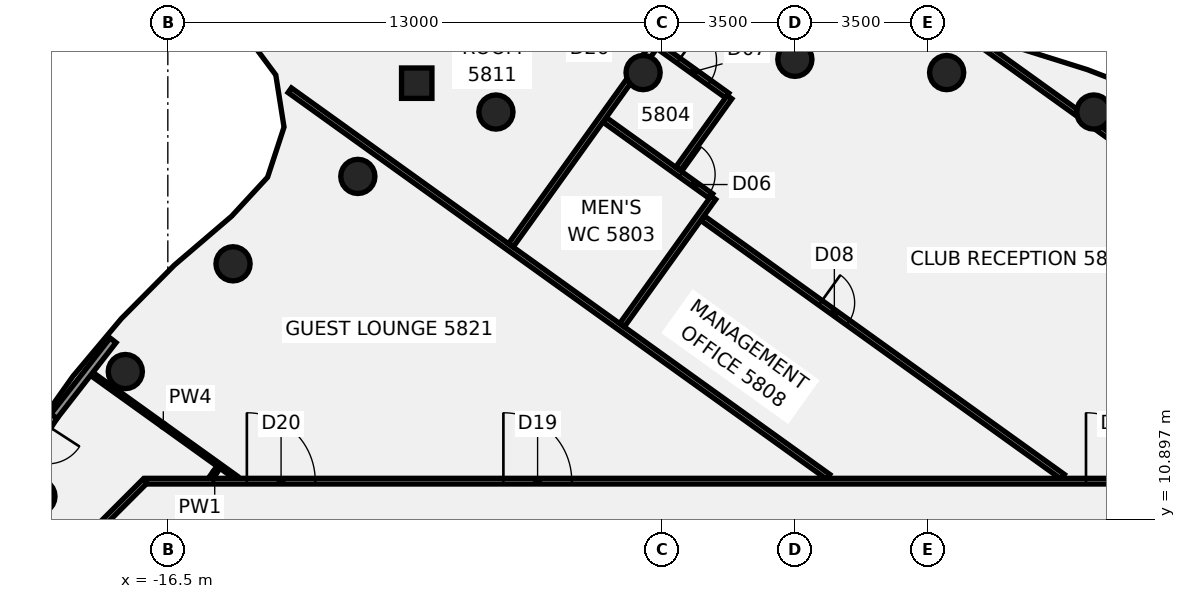
"""IFC4 building model, lengths in metres.
Left out: names, types, materials, properties, quantities, classifications, styles, units other than length and angle.
Written with IfcOpenShell. Run it as: python <this file> out.ifc"""

import sys

from ifc_helpers import new_model, si_unit, direction, frame, frame_2d, origin, origin_2d, place, context, subcontext, project, spatial, rectangle, circle, extrude, element, fill, save


model = new_model("IFC4")
c1 = context("Model", 3, precision=1e-05, world=origin(), true_north=direction((0.0, 1.0)))
c2 = subcontext(c1, "Body", "Model", "MODEL_VIEW")
j1 = project(units=[si_unit("LENGTHUNIT", "METRE"), si_unit("PLANEANGLEUNIT", "RADIAN")], contexts=[c1])
p1 = place(None, origin())
s1 = spatial("IfcSite", under=j1, at=p1, CompositionType="ELEMENT")
p2 = place(p1, origin())
s2 = spatial("IfcBuilding", under=s1, at=p2, CompositionType="ELEMENT")
p3 = place(p2, frame((0.0, 0.0, 230.7)))
s3 = spatial("IfcBuildingStorey", under=s2, at=p3, CompositionType="ELEMENT", Elevation=230.7)
for number, where, z_axis, x_axis in (
    (1, (7.866, 21.613, -0.14), (0.0, 0.0, 1.0), (1.0, 0.0, 0.0)),
    (2, (3.994, 22.651, -0.14), (0.0, 0.0, 1.0), (1.0, 0.0, 0.0)),
    (3, (0.0, 23.0, -0.14), (0.0, 0.0, 1.0), (1.0, 0.0, 0.0)),
    (4, (-3.994, 22.651, -0.14), (0.0, 0.0, 1.0), (1.0, 0.0, 0.0)),
    (5, (-7.866, 21.613, -0.14), (0.0, 0.0, 1.0), (1.0, 0.0, 0.0)),
    (6, (-11.5, 19.919, -0.14), (0.0, 0.0, 1.0), (1.0, 0.0, 0.0)),
    (7, (-14.784, 17.619, -0.14), (0.0, 0.0, 1.0), (1.0, 0.0, 0.0)),
    (8, (-17.619, 14.784, -0.14), (0.0, 0.0, 1.0), (1.0, 0.0, 0.0)),
    (9, (-19.919, 11.5, -0.14), (0.0, 0.0, 1.0), (1.0, 0.0, 0.0)),
):
    element("IfcColumn", number, at=place(p3, frame(where, z_axis=z_axis, x_axis=x_axis)), inside=s3, PredefinedType="COLUMN", context=c2, shape_type="SweptSolid", body=[
        extrude(circle(Radius=0.45, at=origin_2d()), origin(), (0.0, 0.0, 1.0), 3.6),
    ])
p4 = place(p3, frame((-9.95, 22.372, -0.139), z_axis=(-0.001423368327, -0.050360127001, 0.998730109505), x_axis=(0.583112220607, 0.811318568175, 0.041741096219)))
e10 = element("IfcColumn", 10, at=p4, inside=s3, PredefinedType="COLUMN", context=c2, shape_type="SweptSolid", body=[
    extrude(rectangle(XDim=0.8, YDim=0.8, at=origin_2d()), origin(), (0.0, 0.0, 1.0), 3.602),
])
p5 = place(p3, frame((-18.533, 14.744, 0.0), z_axis=(0.0, 0.0, 1.0), x_axis=(0.812404895157, -0.583093720019, 0.0)))
e11 = element("IfcWall", 11, at=p5, inside=s3, PredefinedType="PARTITIONING", context=c2, shape_type="SweptSolid", body=[
    extrude(rectangle(XDim=4.713, YDim=0.1, at=frame_2d((2.357, 0.0))), origin(), (0.0, 0.0, 1.0), 2.864),
])
p6 = place(p3, frame((-13.291, 22.185, 0.0), z_axis=(0.0, 0.0, 1.0), x_axis=(0.812381382917, -0.583126477439, 0.0)))
e12 = element("IfcWall", 12, at=p6, inside=s3, PredefinedType="PARTITIONING", context=c2, shape_type="SweptSolid", body=[
    extrude(rectangle(XDim=17.438, YDim=0.15, at=frame_2d((8.719, 0.0))), origin(), (0.0, 0.0, 1.0), 2.864),
])
p7 = place(p3, frame((-5.005, 21.407, 0.0), z_axis=(0.0, 0.0, 1.0), x_axis=(0.812433901196, -0.583053304757, 0.0)))
e13 = element("IfcWall", 13, at=p7, inside=s3, PredefinedType="PARTITIONING", context=c2, shape_type="SweptSolid", body=[
    extrude(rectangle(XDim=3.445, YDim=0.15, at=frame_2d((1.723, 0.0))), origin(), (0.0, 0.0, 1.0), 2.864),
])
p8 = place(p7, frame((2.47, 0.0, 0.0)))
e14 = element("IfcOpeningElement", 14, at=p8, cuts=e13, PredefinedType="OPENING", context=c2, shape_type="SweptSolid", body=[
    extrude(rectangle(XDim=0.9, YDim=2.1, at=frame_2d((0.45, 1.05))), frame((0.0, 0.085, 0.0), z_axis=(0.0, -1.0, 0.0), x_axis=(1.0, 0.0, 0.0)), (0.0, 0.0, 1.0), 0.17),
])
p9 = place(p3, frame((-3.589, 23.345, 0.0), z_axis=(0.0, 0.0, 1.0), x_axis=(0.812463673424, -0.583011817518, 0.0)))
e15 = element("IfcWall", 15, at=p9, inside=s3, PredefinedType="PARTITIONING", context=c2, shape_type="SweptSolid", body=[
    extrude(rectangle(XDim=2.225, YDim=0.15, at=frame_2d((1.112, 0.0))), origin(), (0.0, 0.0, 1.0), 2.864),
])
p10 = place(p9, frame((0.65, 0.0, 0.0)))
e16 = element("IfcOpeningElement", 16, at=p10, cuts=e15, PredefinedType="OPENING", context=c2, shape_type="SweptSolid", body=[
    extrude(rectangle(XDim=1.0, YDim=2.1, at=frame_2d((0.5, 1.05))), frame((0.0, 0.085, 0.0), z_axis=(0.0, -1.0, 0.0), x_axis=(1.0, 0.0, 0.0)), (0.0, 0.0, 1.0), 0.17),
])
p11 = place(p3, frame((-2.43, 18.82, 0.0), z_axis=(0.0, 0.0, 1.0), x_axis=(0.812379650035, -0.583128891592, 0.0)))
e17 = element("IfcWall", 17, at=p11, inside=s3, PredefinedType="PARTITIONING", context=c2, shape_type="SweptSolid", body=[
    extrude(rectangle(XDim=11.667, YDim=0.15, at=frame_2d((5.834, 0.0))), origin(), (0.0, 0.0, 1.0), 2.864),
])
p12 = place(p11, frame((3.82, 0.0, 0.0)))
e18 = element("IfcOpeningElement", 18, at=p12, cuts=e17, PredefinedType="OPENING", context=c2, shape_type="SweptSolid", body=[
    extrude(rectangle(XDim=0.9, YDim=2.1, at=frame_2d((0.45, 1.05))), frame((0.0, 0.085, 0.0), z_axis=(0.0, -1.0, 0.0), x_axis=(1.0, 0.0, 0.0)), (0.0, 0.0, 1.0), 0.17),
])
p13 = place(p3, frame((4.547, 23.66, 0.0), z_axis=(0.0, 0.0, 1.0), x_axis=(0.812386891105, -0.583118803642, 0.0)))
e19 = element("IfcWall", 19, at=p13, inside=s3, PredefinedType="PARTITIONING", context=c2, shape_type="SweptSolid", body=[
    extrude(rectangle(XDim=3.521, YDim=0.15, at=frame_2d((1.761, 0.0))), origin(), (0.0, 0.0, 1.0), 2.864),
])
p14 = place(p3, frame((7.993, 21.187, 0.0), z_axis=(0.0, 0.0, 1.0), x_axis=(0.81239794632, -0.583103401478, 0.0)))
e20 = element("IfcWall", 20, at=p14, inside=s3, PredefinedType="PARTITIONING", context=c2, shape_type="SweptSolid", body=[
    extrude(rectangle(XDim=6.953, YDim=0.15, at=frame_2d((3.477, 0.0))), origin(), (0.0, 0.0, 1.0), 2.864),
])
p15 = place(p14, frame((4.2, 0.0, 0.0)))
e21 = element("IfcOpeningElement", 21, at=p15, cuts=e20, PredefinedType="OPENING", context=c2, shape_type="SweptSolid", body=[
    extrude(rectangle(XDim=0.9, YDim=2.1, at=frame_2d((0.45, 1.05))), frame((0.0, 0.085, 0.0), z_axis=(0.0, -1.0, 0.0), x_axis=(1.0, 0.0, 0.0)), (0.0, 0.0, 1.0), 0.17),
])
p16 = place(p3, frame((-17.065, 11.9, 0.0), z_axis=(0.0, 0.0, 1.0), x_axis=(1.0, 0.0, 0.0)))
e22 = element("IfcWall", 22, at=p16, inside=s3, PredefinedType="PARTITIONING", context=c2, shape_type="SweptSolid", body=[
    extrude(rectangle(XDim=34.165, YDim=0.15, at=frame_2d((17.083, 0.0))), origin(), (0.0, 0.0, 1.0), 2.864),
])
p17 = place(p16, frame((24.726, 0.0, 0.0)))
e23 = element("IfcOpeningElement", 23, at=p17, cuts=e22, PredefinedType="OPENING", context=c2, shape_type="SweptSolid", body=[
    extrude(rectangle(XDim=1.8, YDim=2.1, at=frame_2d((0.9, 1.05))), frame((0.0, 0.085, 0.0), z_axis=(0.0, -1.0, 0.0), x_axis=(1.0, 0.0, 0.0)), (0.0, 0.0, 1.0), 0.17),
])
p18 = place(p16, frame((9.395, 0.0, 0.0)))
e24 = element("IfcOpeningElement", 24, at=p18, cuts=e22, PredefinedType="OPENING", context=c2, shape_type="SweptSolid", body=[
    extrude(rectangle(XDim=1.8, YDim=2.1, at=frame_2d((0.9, 1.05))), frame((0.0, 0.085, 0.0), z_axis=(0.0, -1.0, 0.0), x_axis=(1.0, 0.0, 0.0)), (0.0, 0.0, 1.0), 0.17),
])
p19 = place(p16, frame((2.645, 0.0, 0.0)))
e25 = element("IfcOpeningElement", 25, at=p19, cuts=e22, PredefinedType="OPENING", context=c2, shape_type="SweptSolid", body=[
    extrude(rectangle(XDim=1.8, YDim=2.1, at=frame_2d((0.9, 1.05))), frame((0.0, 0.085, 0.0), z_axis=(0.0, -1.0, 0.0), x_axis=(1.0, 0.0, 0.0)), (0.0, 0.0, 1.0), 0.17),
])
p20 = place(p3, frame((-18.872, 10.128, 0.0), z_axis=(0.0, 0.0, 1.0), x_axis=(0.707106781187, 0.707106781187, 0.0)))
e26 = element("IfcWall", 26, at=p20, inside=s3, PredefinedType="PARTITIONING", context=c2, shape_type="SweptSolid", body=[
    extrude(rectangle(XDim=2.505, YDim=0.15, at=frame_2d((1.253, 0.0))), origin(), (0.0, 0.0, 1.0), 2.864),
])
p21 = place(p3, frame((-15.367, 11.985, 0.0), z_axis=(0.0, 0.0, 1.0), x_axis=(0.583110991792, 0.812392498274, 0.0)))
e27 = element("IfcWall", 27, at=p21, inside=s3, PredefinedType="PARTITIONING", context=c2, shape_type="SweptSolid", body=[
    extrude(rectangle(XDim=0.345, YDim=0.1, at=frame_2d((0.172, 0.0))), origin(), (0.0, 0.0, 1.0), 2.864),
])
p22 = place(p3, frame((-7.472, 18.107, 0.0), z_axis=(0.0, 0.0, 1.0), x_axis=(0.583113446938, 0.812390736038, 0.0)))
e28 = element("IfcWall", 28, at=p22, inside=s3, PredefinedType="PARTITIONING", context=c2, shape_type="SweptSolid", body=[
    extrude(rectangle(XDim=5.488, YDim=0.15, at=frame_2d((2.744, 0.0))), origin(), (0.0, 0.0, 1.0), 2.864),
])
p23 = place(p3, frame((-4.01, 22.931, 0.0), z_axis=(0.0, 0.0, 1.0), x_axis=(0.58311350021, 0.8123906978, 0.0)))
e29 = element("IfcWall", 29, at=p23, inside=s3, PredefinedType="PARTITIONING", context=c2, shape_type="SweptSolid", body=[
    extrude(rectangle(XDim=8.281, YDim=0.2, at=frame_2d((4.141, 0.0))), origin(), (0.0, 0.0, 1.0), 2.864),
])
p24 = place(p23, frame((0.882, 0.0, 0.0)))
e30 = element("IfcOpeningElement", 30, at=p24, cuts=e29, PredefinedType="OPENING", context=c2, shape_type="SweptSolid", body=[
    extrude(rectangle(XDim=1.4, YDim=2.1, at=frame_2d((0.7, 1.05))), frame((0.0, 0.11, 0.0), z_axis=(0.0, -1.0, 0.0), x_axis=(1.0, 0.0, 0.0)), (0.0, 0.0, 1.0), 0.22),
])
p25 = place(p3, frame((-4.547, 16.007, 0.0), z_axis=(0.0, 0.0, 1.0), x_axis=(0.583002261938, 0.812470530281, 0.0)))
e31 = element("IfcWall", 31, at=p25, inside=s3, PredefinedType="PARTITIONING", context=c2, shape_type="SweptSolid", body=[
    extrude(rectangle(XDim=4.121, YDim=0.15, at=frame_2d((2.06, 0.0))), origin(), (0.0, 0.0, 1.0), 2.864),
])
p26 = place(p3, frame((-3.073, 20.12, 0.0), z_axis=(0.0, 0.0, 1.0), x_axis=(0.58343649738, 0.812158761281, 0.0)))
e32 = element("IfcWall", 32, at=p26, inside=s3, PredefinedType="PARTITIONING", context=c2, shape_type="SweptSolid", body=[
    extrude(rectangle(XDim=2.32, YDim=0.15, at=frame_2d((1.16, 0.0))), origin(), (0.0, 0.0, 1.0), 2.864),
])
p27 = place(p3, frame((-17.941, 15.606, 0.0), z_axis=(0.0, 0.0, 1.0), x_axis=(-0.614194041126, -0.789155041703, 0.0)))
e33 = element("IfcWall", 33, at=p27, inside=s3, PredefinedType="SOLIDWALL", context=c2, shape_type="SweptSolid", body=[
    extrude(rectangle(XDim=2.534, YDim=0.2, at=frame_2d((1.267, 0.0))), origin(), (0.0, 0.0, 1.0), 3.46),
])
p28 = place(p3, frame((-19.498, 13.607, 0.0), z_axis=(0.0, 0.0, 1.0), x_axis=(-0.54458033139, -0.838708687604, 0.0)))
e34 = element("IfcWall", 34, at=p28, inside=s3, PredefinedType="SOLIDWALL", context=c2, shape_type="SweptSolid", body=[
    extrude(rectangle(XDim=1.599, YDim=0.2, at=frame_2d((0.799, 0.0))), origin(), (0.0, 0.0, 1.0), 3.46),
])
p29 = place(p28, frame((0.299, 0.0, 0.0)))
e35 = element("IfcOpeningElement", 35, at=p29, cuts=e34, PredefinedType="OPENING", context=c2, shape_type="SweptSolid", body=[
    extrude(rectangle(XDim=1.0, YDim=2.4, at=frame_2d((0.5, 1.2))), frame((0.0, 0.11, 0.0), z_axis=(0.0, -1.0, 0.0), x_axis=(1.0, 0.0, 0.0)), (0.0, 0.0, 1.0), 0.22),
])
p30 = place(p8, frame((0.9, 0.0, 0.0), z_axis=(0.0, 0.0, 1.0), x_axis=(-1.0, 0.0, 0.0)))
e36 = element("IfcDoor", 36, at=p30, inside=s3, OperationType="SINGLE_SWING_RIGHT", PredefinedType="DOOR", context=c2, shape_type="SweptSolid", body=[
    extrude(rectangle(XDim=0.9, YDim=2.1, at=frame_2d((0.45, 1.05))), frame((0.0, 0.025, 0.0), z_axis=(0.0, -1.0, 0.0), x_axis=(1.0, 0.0, 0.0)), (0.0, 0.0, 1.0), 0.05),
])
fill(e14, e36)
p31 = place(p10, frame((1.0, 0.0, 0.0), z_axis=(0.0, 0.0, 1.0), x_axis=(-1.0, 0.0, 0.0)))
e37 = element("IfcDoor", 37, at=p31, inside=s3, OperationType="SINGLE_SWING_RIGHT", PredefinedType="DOOR", context=c2, shape_type="SweptSolid", body=[
    extrude(rectangle(XDim=1.0, YDim=2.1, at=frame_2d((0.5, 1.05))), frame((0.0, 0.025, 0.0), z_axis=(0.0, -1.0, 0.0), x_axis=(1.0, 0.0, 0.0)), (0.0, 0.0, 1.0), 0.05),
])
fill(e16, e37)
p32 = place(p12, frame((0.9, 0.0, 0.0), z_axis=(0.0, 0.0, 1.0), x_axis=(-1.0, 0.0, 0.0)))
e38 = element("IfcDoor", 38, at=p32, inside=s3, OperationType="SINGLE_SWING_LEFT", PredefinedType="DOOR", context=c2, shape_type="SweptSolid", body=[
    extrude(rectangle(XDim=0.9, YDim=2.1, at=frame_2d((0.45, 1.05))), frame((0.0, 0.025, 0.0), z_axis=(0.0, -1.0, 0.0), x_axis=(1.0, 0.0, 0.0)), (0.0, 0.0, 1.0), 0.05),
])
fill(e18, e38)
p33 = place(p17, frame((1.8, 0.0, 0.0), z_axis=(0.0, 0.0, 1.0), x_axis=(-1.0, 0.0, 0.0)))
e39 = element("IfcDoor", 39, at=p33, inside=s3, OperationType="DOUBLE_DOOR_SINGLE_SWING", PredefinedType="DOOR", context=c2, shape_type="SweptSolid", body=[
    extrude(rectangle(XDim=1.8, YDim=2.1, at=frame_2d((0.9, 1.05))), frame((0.0, 0.025, 0.0), z_axis=(0.0, -1.0, 0.0), x_axis=(1.0, 0.0, 0.0)), (0.0, 0.0, 1.0), 0.05),
])
fill(e23, e39)
p34 = place(p18, origin())
e40 = element("IfcDoor", 40, at=p34, inside=s3, OperationType="DOUBLE_DOOR_SINGLE_SWING", PredefinedType="DOOR", context=c2, shape_type="SweptSolid", body=[
    extrude(rectangle(XDim=1.8, YDim=2.1, at=frame_2d((0.9, 1.05))), frame((0.0, 0.025, 0.0), z_axis=(0.0, -1.0, 0.0), x_axis=(1.0, 0.0, 0.0)), (0.0, 0.0, 1.0), 0.05),
])
fill(e24, e40)
p35 = place(p19, origin())
e41 = element("IfcDoor", 41, at=p35, inside=s3, OperationType="DOUBLE_DOOR_SINGLE_SWING", PredefinedType="DOOR", context=c2, shape_type="SweptSolid", body=[
    extrude(rectangle(XDim=1.8, YDim=2.1, at=frame_2d((0.9, 1.05))), frame((0.0, 0.025, 0.0), z_axis=(0.0, -1.0, 0.0), x_axis=(1.0, 0.0, 0.0)), (0.0, 0.0, 1.0), 0.05),
])
fill(e25, e41)
save(model, sys.argv[1])
